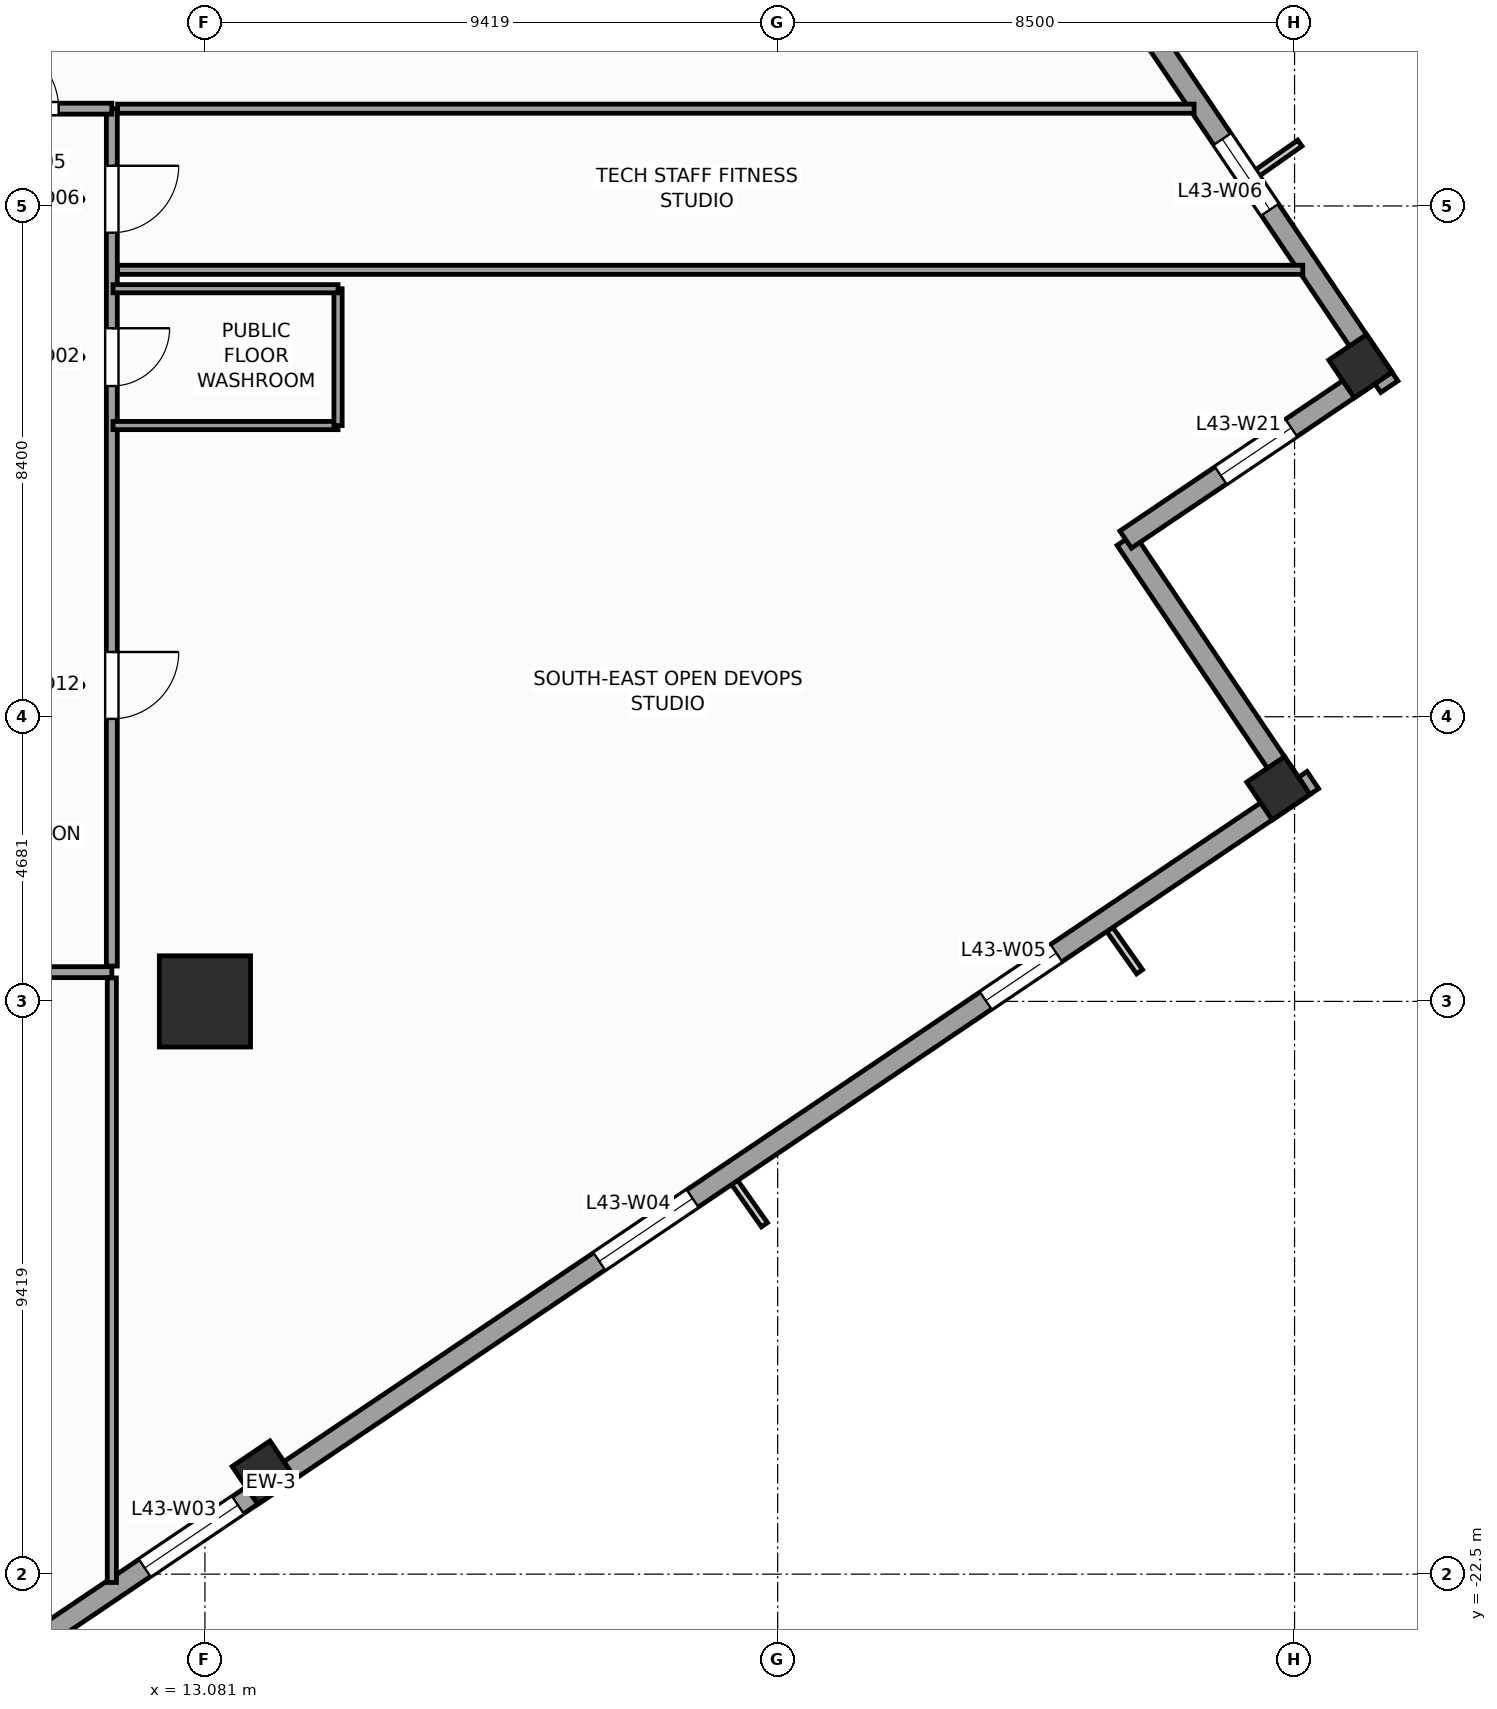
"""IFC4 building model, lengths in metres.
Left out: names, types, materials, properties, quantities, classifications, styles, units other than length and angle.
Written with IfcOpenShell. Run it as: python <this file> out.ifc"""

import sys

from ifc_helpers import new_model, si_unit, direction, frame, frame_2d, origin, origin_2d, place, context, subcontext, project, spatial, rectangle, extrude, source, transform, mapped, element, fill, save


model = new_model("IFC4")
c1 = context("Model", 3, precision=1e-05, world=origin(), true_north=direction((0.0, 1.0)))
c2 = subcontext(c1, "Body", "Model", "MODEL_VIEW")
j1 = project(units=[si_unit("LENGTHUNIT", "METRE"), si_unit("PLANEANGLEUNIT", "RADIAN")], contexts=[c1])
p1 = place(None, origin())
s1 = spatial("IfcSite", under=j1, at=p1, CompositionType="ELEMENT")
p2 = place(p1, origin())
s2 = spatial("IfcBuilding", under=s1, at=p2, CompositionType="ELEMENT")
p3 = place(p2, frame((0.0, 0.0, 180.4)))
s3 = spatial("IfcBuildingStorey", under=s2, at=p3, CompositionType="ELEMENT", Elevation=180.4)
m1 = source(origin(), c2, "Body", "SweptSolid", [
    extrude(rectangle(XDim=1.5, YDim=1.5, at=origin_2d()), origin(), (0.0, 0.0, 1.0), 4.0),
])
p4 = place(p3, frame((13.081, -13.081, 0.0), z_axis=(0.0, 0.0, 1.0), x_axis=(1.0, 0.0, 0.0)))
e1 = element("IfcColumn", 1, at=p4, inside=s3, PredefinedType="COLUMN", context=c2, shape_type="MappedRepresentation", body=[
    mapped(m1, transform((0.0, 0.0, 0.0), scale=1.0)),
])
m2 = source(origin(), c2, "Body", "SweptSolid", [
    extrude(rectangle(XDim=0.75, YDim=0.75, at=origin_2d()), origin(), (0.0, 0.0, 1.0), 4.0),
])
for number, where, z_axis, x_axis in (
    (2, (14.05, -20.83, 0.0), (0.0, 0.0, 1.0), (0.829, 0.559, 0.0)),
    (3, (30.734, -9.576, 0.0), (0.0, 0.0, 1.0), (0.829, 0.559, 0.0)),
    (4, (32.083, -2.635, 0.0), (0.0, 0.0, 1.0), (0.829, 0.559, 0.0)),
):
    element("IfcColumn", number, at=place(p3, frame(where, z_axis=z_axis, x_axis=x_axis)), inside=s3, PredefinedType="COLUMN", context=c2, shape_type="MappedRepresentation", body=[
        mapped(m2, transform((0.0, 0.0, 0.0), scale=1.0)),
    ])
p5 = place(p3, frame((-2.972, -32.558, 0.0), z_axis=(0.0, 0.0, 1.0), x_axis=(0.829036218961, 0.559194910251, 0.0)))
e5 = element("IfcWall", 5, at=p5, inside=s3, PredefinedType="STANDARD", context=c2, shape_type="SweptSolid", body=[
    extrude(rectangle(XDim=41.34, YDim=0.34, at=frame_2d((20.67, 0.0))), origin(), (0.0, 0.0, 1.0), 3.04),
])
p6 = place(p5, frame((4.261, 0.0, 0.56)))
e6 = element("IfcOpeningElement", 6, at=p6, cuts=e5, PredefinedType="OPENING", context=c2, shape_type="SweptSolid", body=[
    extrude(rectangle(XDim=1.4, YDim=2.4, at=frame_2d((0.7, 1.2))), frame((0.0, 0.18, 0.0), z_axis=(0.0, -1.0, 0.0), x_axis=(1.0, 0.0, 0.0)), (0.0, 0.0, 1.0), 0.36),
])
p7 = place(p5, frame((11.064, 0.0, 0.61)))
e7 = element("IfcOpeningElement", 7, at=p7, cuts=e5, PredefinedType="OPENING", context=c2, shape_type="SweptSolid", body=[
    extrude(rectangle(XDim=1.85, YDim=2.35, at=frame_2d((0.925, 1.175))), frame((0.0, 0.18, 0.0), z_axis=(0.0, -1.0, 0.0), x_axis=(1.0, 0.0, 0.0)), (0.0, 0.0, 1.0), 0.36),
])
p8 = place(p5, frame((18.168, 0.0, 0.61)))
e8 = element("IfcOpeningElement", 8, at=p8, cuts=e5, PredefinedType="OPENING", context=c2, shape_type="SweptSolid", body=[
    extrude(rectangle(XDim=1.85, YDim=2.35, at=frame_2d((0.925, 1.175))), frame((0.0, 0.18, 0.0), z_axis=(0.0, -1.0, 0.0), x_axis=(1.0, 0.0, 0.0)), (0.0, 0.0, 1.0), 0.36),
])
p9 = place(p5, frame((27.186, 0.0, 0.61)))
e9 = element("IfcOpeningElement", 9, at=p9, cuts=e5, PredefinedType="OPENING", context=c2, shape_type="SweptSolid", body=[
    extrude(rectangle(XDim=1.85, YDim=2.35, at=frame_2d((0.925, 1.175))), frame((0.0, 0.18, 0.0), z_axis=(0.0, -1.0, 0.0), x_axis=(1.0, 0.0, 0.0)), (0.0, 0.0, 1.0), 0.36),
])
p10 = place(p5, frame((34.852, 0.0, 0.56)))
e10 = element("IfcOpeningElement", 10, at=p10, cuts=e5, PredefinedType="OPENING", context=c2, shape_type="SweptSolid", body=[
    extrude(rectangle(XDim=1.4, YDim=2.4, at=frame_2d((0.7, 1.2))), frame((0.0, 0.18, 0.0), z_axis=(0.0, -1.0, 0.0), x_axis=(1.0, 0.0, 0.0)), (0.0, 0.0, 1.0), 0.36),
])
p11 = place(p3, frame((31.019, -9.631, 0.0), z_axis=(0.0, 0.0, 1.0), x_axis=(-0.559210350234, 0.829025804298, 0.0)))
e11 = element("IfcWall", 11, at=p11, inside=s3, PredefinedType="STANDARD", context=c2, shape_type="SweptSolid", body=[
    extrude(rectangle(XDim=5.0, YDim=0.34, at=frame_2d((2.5, 0.0))), origin(), (0.0, 0.0, 1.0), 3.74),
])
p12 = place(p3, frame((28.223, -5.486, 0.0), z_axis=(0.0, 0.0, 1.0), x_axis=(0.82905227345, 0.559171107879, 0.0)))
e12 = element("IfcWall", 12, at=p12, inside=s3, PredefinedType="STANDARD", context=c2, shape_type="SweptSolid", body=[
    extrude(rectangle(XDim=5.17, YDim=0.34, at=frame_2d((2.585, 0.0))), origin(), (0.0, 0.0, 1.0), 3.04),
])
p13 = place(p12, frame((1.885, 0.0, 0.56)))
e13 = element("IfcOpeningElement", 13, at=p13, cuts=e12, PredefinedType="OPENING", context=c2, shape_type="SweptSolid", body=[
    extrude(rectangle(XDim=1.4, YDim=2.4, at=frame_2d((0.7, 1.2))), frame((0.0, 0.18, 0.0), z_axis=(0.0, -1.0, 0.0), x_axis=(1.0, 0.0, 0.0)), (0.0, 0.0, 1.0), 0.36),
])
p14 = place(p3, frame((32.558, -2.972, 0.0), z_axis=(0.0, 0.0, 1.0), x_axis=(-0.559194910251, 0.829036218961, 0.0)))
e14 = element("IfcWall", 14, at=p14, inside=s3, PredefinedType="STANDARD", context=c2, shape_type="SweptSolid", body=[
    extrude(rectangle(XDim=41.34, YDim=0.34, at=frame_2d((20.67, 0.0))), origin(), (0.0, 0.0, 1.0), 3.04),
])
p15 = place(p14, frame((25.745, 0.0, 0.0)))
e15 = element("IfcOpeningElement", 15, at=p15, cuts=e14, PredefinedType="OPENING", context=c2, shape_type="SweptSolid", body=[
    extrude(rectangle(XDim=1.05, YDim=2.25, at=frame_2d((0.525, 1.125))), frame((0.0, 0.18, 0.0), z_axis=(0.0, -1.0, 0.0), x_axis=(1.0, 0.0, 0.0)), (0.0, 0.0, 1.0), 0.36),
])
p16 = place(p14, frame((3.511, 0.0, 0.56)))
e16 = element("IfcOpeningElement", 16, at=p16, cuts=e14, PredefinedType="OPENING", context=c2, shape_type="SweptSolid", body=[
    extrude(rectangle(XDim=1.4, YDim=2.4, at=frame_2d((0.7, 1.2))), frame((0.0, 0.18, 0.0), z_axis=(0.0, -1.0, 0.0), x_axis=(1.0, 0.0, 0.0)), (0.0, 0.0, 1.0), 0.36),
])
p17 = place(p14, frame((11.064, 0.0, 0.61)))
e17 = element("IfcOpeningElement", 17, at=p17, cuts=e14, PredefinedType="OPENING", context=c2, shape_type="SweptSolid", body=[
    extrude(rectangle(XDim=1.85, YDim=2.35, at=frame_2d((0.925, 1.175))), frame((0.0, 0.18, 0.0), z_axis=(0.0, -1.0, 0.0), x_axis=(1.0, 0.0, 0.0)), (0.0, 0.0, 1.0), 0.36),
])
p18 = place(p14, frame((18.168, 0.0, 0.61)))
e18 = element("IfcOpeningElement", 18, at=p18, cuts=e14, PredefinedType="OPENING", context=c2, shape_type="SweptSolid", body=[
    extrude(rectangle(XDim=1.85, YDim=2.35, at=frame_2d((0.925, 1.175))), frame((0.0, 0.18, 0.0), z_axis=(0.0, -1.0, 0.0), x_axis=(1.0, 0.0, 0.0)), (0.0, 0.0, 1.0), 0.36),
])
p19 = place(p14, frame((27.936, 0.0, 0.61)))
e19 = element("IfcOpeningElement", 19, at=p19, cuts=e14, PredefinedType="OPENING", context=c2, shape_type="SweptSolid", body=[
    extrude(rectangle(XDim=1.85, YDim=2.35, at=frame_2d((0.925, 1.175))), frame((0.0, 0.18, 0.0), z_axis=(0.0, -1.0, 0.0), x_axis=(1.0, 0.0, 0.0)), (0.0, 0.0, 1.0), 0.36),
])
p20 = place(p14, frame((34.852, 0.0, 0.56)))
e20 = element("IfcOpeningElement", 20, at=p20, cuts=e14, PredefinedType="OPENING", context=c2, shape_type="SweptSolid", body=[
    extrude(rectangle(XDim=1.4, YDim=2.4, at=frame_2d((0.7, 1.2))), frame((0.0, 0.18, 0.0), z_axis=(0.0, -1.0, 0.0), x_axis=(1.0, 0.0, 0.0)), (0.0, 0.0, 1.0), 0.36),
])
p21 = place(p3, frame((-10.45, -12.6, 0.0), z_axis=(0.0, 0.0, 1.0), x_axis=(1.0, 0.0, 0.0)))
e21 = element("IfcWall", 21, at=p21, inside=s3, PredefinedType="PARTITIONING", context=c2, shape_type="SweptSolid", body=[
    extrude(rectangle(XDim=22.0, YDim=0.18, at=frame_2d((11.0, 0.0))), origin(), (0.0, 0.0, 1.0), 3.74),
])
p22 = place(p21, frame((11.286, 0.0, 0.0)))
e22 = element("IfcOpeningElement", 22, at=p22, cuts=e21, PredefinedType="OPENING", context=c2, shape_type="SweptSolid", body=[
    extrude(rectangle(XDim=0.95, YDim=2.1, at=frame_2d((0.475, 1.05))), frame((0.0, 0.1, 0.0), z_axis=(0.0, -1.0, 0.0), x_axis=(1.0, 0.0, 0.0)), (0.0, 0.0, 1.0), 0.2),
])
p23 = place(p21, frame((4.839, 0.0, 0.0)))
e23 = element("IfcOpeningElement", 23, at=p23, cuts=e21, PredefinedType="OPENING", context=c2, shape_type="SweptSolid", body=[
    extrude(rectangle(XDim=1.1, YDim=2.2, at=frame_2d((0.55, 1.1))), frame((0.0, 0.1, 0.0), z_axis=(0.0, -1.0, 0.0), x_axis=(1.0, 0.0, 0.0)), (0.0, 0.0, 1.0), 0.2),
])
p24 = place(p21, frame((16.66, 0.0, 0.0)))
e24 = element("IfcOpeningElement", 24, at=p24, cuts=e21, PredefinedType="OPENING", context=c2, shape_type="SweptSolid", body=[
    extrude(rectangle(XDim=1.1, YDim=2.2, at=frame_2d((0.55, 1.1))), frame((0.0, 0.1, 0.0), z_axis=(0.0, -1.0, 0.0), x_axis=(1.0, 0.0, 0.0)), (0.0, 0.0, 1.0), 0.2),
])
p25 = place(p3, frame((11.55, -12.5, 0.0), z_axis=(0.0, 0.0, 1.0), x_axis=(0.0, 1.0, 0.0)))
e25 = element("IfcWall", 25, at=p25, inside=s3, PredefinedType="PARTITIONING", context=c2, shape_type="SweptSolid", body=[
    extrude(rectangle(XDim=14.1, YDim=0.18, at=frame_2d((7.05, 0.0))), origin(), (0.0, 0.0, 1.0), 3.74),
])
p26 = place(p25, frame((9.539, 0.0, 0.0)))
e26 = element("IfcOpeningElement", 26, at=p26, cuts=e25, PredefinedType="OPENING", context=c2, shape_type="SweptSolid", body=[
    extrude(rectangle(XDim=0.95, YDim=2.1, at=frame_2d((0.475, 1.05))), frame((0.0, 0.1, 0.0), z_axis=(0.0, -1.0, 0.0), x_axis=(1.0, 0.0, 0.0)), (0.0, 0.0, 1.0), 0.2),
])
p27 = place(p25, frame((12.061, 0.0, 0.0)))
e27 = element("IfcOpeningElement", 27, at=p27, cuts=e25, PredefinedType="OPENING", context=c2, shape_type="SweptSolid", body=[
    extrude(rectangle(XDim=1.1, YDim=2.2, at=frame_2d((0.55, 1.1))), frame((0.0, 0.1, 0.0), z_axis=(0.0, -1.0, 0.0), x_axis=(1.0, 0.0, 0.0)), (0.0, 0.0, 1.0), 0.2),
])
p28 = place(p25, frame((4.065, 0.0, 0.0)))
e28 = element("IfcOpeningElement", 28, at=p28, cuts=e25, PredefinedType="OPENING", context=c2, shape_type="SweptSolid", body=[
    extrude(rectangle(XDim=1.1, YDim=2.2, at=frame_2d((0.55, 1.1))), frame((0.0, 0.1, 0.0), z_axis=(0.0, -1.0, 0.0), x_axis=(1.0, 0.0, 0.0)), (0.0, 0.0, 1.0), 0.2),
])
p29 = place(p3, frame((8.7, 1.6, 0.0), z_axis=(0.0, 0.0, 1.0), x_axis=(1.0, 0.0, 0.0)))
e29 = element("IfcWall", 29, at=p29, inside=s3, PredefinedType="PARTITIONING", context=c2, shape_type="SweptSolid", body=[
    extrude(rectangle(XDim=2.85, YDim=0.18, at=frame_2d((1.425, 0.0))), origin(), (0.0, 0.0, 1.0), 3.74),
])
p30 = place(p29, frame((0.875, 0.0, 0.0)))
e30 = element("IfcOpeningElement", 30, at=p30, cuts=e29, PredefinedType="OPENING", context=c2, shape_type="SweptSolid", body=[
    extrude(rectangle(XDim=1.1, YDim=2.2, at=frame_2d((0.55, 1.1))), frame((0.0, 0.1, 0.0), z_axis=(0.0, -1.0, 0.0), x_axis=(1.0, 0.0, 0.0)), (0.0, 0.0, 1.0), 0.2),
])
p31 = place(p3, frame((11.645, -1.05, 0.0), z_axis=(0.0, 0.0, 1.0), x_axis=(1.0, 0.0, 0.0)))
e31 = element("IfcWall", 31, at=p31, inside=s3, PredefinedType="PARTITIONING", context=c2, shape_type="SweptSolid", body=[
    extrude(rectangle(XDim=19.49, YDim=0.15, at=frame_2d((9.745, 0.0))), origin(), (0.0, 0.0, 1.0), 3.74),
])
p32 = place(p3, frame((11.645, 1.6, 0.0), z_axis=(0.0, 0.0, 1.0), x_axis=(1.0, 0.0, 0.0)))
e32 = element("IfcWall", 32, at=p32, inside=s3, PredefinedType="PARTITIONING", context=c2, shape_type="SweptSolid", body=[
    extrude(rectangle(XDim=17.703, YDim=0.15, at=frame_2d((8.851, 0.0))), origin(), (0.0, 0.0, 1.0), 3.74),
])
p33 = place(p3, frame((11.55, -22.636, 0.0), z_axis=(0.0, 0.0, 1.0), x_axis=(0.0, 1.0, 0.0)))
e33 = element("IfcWall", 33, at=p33, inside=s3, PredefinedType="PARTITIONING", context=c2, shape_type="SweptSolid", body=[
    extrude(rectangle(XDim=9.941, YDim=0.15, at=frame_2d((4.971, 0.0))), origin(), (0.0, 0.0, 1.0), 3.74),
])
p34 = place(p3, frame((11.57, -3.611, 0.0), z_axis=(0.0, 0.0, 1.0), x_axis=(1.0, 0.0, 0.0)))
e34 = element("IfcWall", 34, at=p34, inside=s3, PredefinedType="PARTITIONING", context=c2, shape_type="SweptSolid", body=[
    extrude(rectangle(XDim=3.7, YDim=0.135, at=frame_2d((1.85, 0.0))), origin(), (0.0, 0.0, 1.0), 3.74),
])
p35 = place(p3, frame((15.27, -3.611, 0.0), z_axis=(0.0, 0.0, 1.0), x_axis=(0.0, 1.0, 0.0)))
e35 = element("IfcWall", 35, at=p35, inside=s3, PredefinedType="PARTITIONING", context=c2, shape_type="SweptSolid", body=[
    extrude(rectangle(XDim=2.25, YDim=0.135, at=frame_2d((1.125, 0.0))), origin(), (0.0, 0.0, 1.0), 3.24),
])
p36 = place(p3, frame((11.57, -1.361, 0.0), z_axis=(0.0, 0.0, 1.0), x_axis=(1.0, 0.0, 0.0)))
e36 = element("IfcWall", 36, at=p36, inside=s3, PredefinedType="PARTITIONING", context=c2, shape_type="SweptSolid", body=[
    extrude(rectangle(XDim=3.7, YDim=0.135, at=frame_2d((1.85, 0.0))), origin(), (0.0, 0.0, 1.0), 3.74),
])
m3 = source(origin(), c2, "Body", "SweptSolid", [
    extrude(rectangle(XDim=1.85, YDim=2.35, at=frame_2d((0.925, 1.175))), frame((0.0, 0.03, 0.0), z_axis=(0.0, -1.0, 0.0), x_axis=(1.0, 0.0, 0.0)), (0.0, 0.0, 1.0), 0.06),
])
p37 = place(p8, origin())
e37 = element("IfcWindow", 37, at=p37, inside=s3, PartitioningType="SINGLE_PANEL", PredefinedType="WINDOW", context=c2, shape_type="MappedRepresentation", body=[
    mapped(m3, transform((0.0, 0.0, 0.0), scale=1.0)),
])
fill(e8, e37)
p38 = place(p9, origin())
e38 = element("IfcWindow", 38, at=p38, inside=s3, PartitioningType="SINGLE_PANEL", PredefinedType="WINDOW", context=c2, shape_type="MappedRepresentation", body=[
    mapped(m3, transform((0.0, 0.0, 0.0), scale=1.0)),
])
fill(e9, e38)
m4 = source(origin(), c2, "Body", "SweptSolid", [
    extrude(rectangle(XDim=1.4, YDim=2.4, at=frame_2d((0.7, 1.2))), frame((0.0, 0.03, 0.0), z_axis=(0.0, -1.0, 0.0), x_axis=(1.0, 0.0, 0.0)), (0.0, 0.0, 1.0), 0.06),
])
p39 = place(p10, origin())
e39 = element("IfcWindow", 39, at=p39, inside=s3, PartitioningType="SINGLE_PANEL", PredefinedType="WINDOW", context=c2, shape_type="MappedRepresentation", body=[
    mapped(m4, transform((0.0, 0.0, 0.0), scale=1.0)),
])
fill(e10, e39)
p40 = place(p16, origin())
e40 = element("IfcWindow", 40, at=p40, inside=s3, PartitioningType="SINGLE_PANEL", PredefinedType="WINDOW", context=c2, shape_type="MappedRepresentation", body=[
    mapped(m4, transform((0.0, 0.0, 0.0), scale=1.0)),
])
fill(e16, e40)
p41 = place(p13, origin())
e41 = element("IfcWindow", 41, at=p41, inside=s3, PartitioningType="SINGLE_PANEL", PredefinedType="WINDOW", context=c2, shape_type="MappedRepresentation", body=[
    mapped(m4, transform((0.0, 0.0, 0.0), scale=1.0)),
])
fill(e13, e41)
m5 = source(origin(), c2, "Body", "SweptSolid", [
    extrude(rectangle(XDim=0.95, YDim=2.1, at=frame_2d((0.475, 1.05))), frame((0.0, 0.025, 0.0), z_axis=(0.0, -1.0, 0.0), x_axis=(1.0, 0.0, 0.0)), (0.0, 0.0, 1.0), 0.05),
])
p42 = place(p26, frame((0.95, 0.0, 0.0), z_axis=(0.0, 0.0, 1.0), x_axis=(-1.0, 0.0, 0.0)))
e42 = element("IfcDoor", 42, at=p42, inside=s3, OperationType="SINGLE_SWING_RIGHT", PredefinedType="DOOR", context=c2, shape_type="MappedRepresentation", body=[
    mapped(m5, transform((0.0, 0.0, 0.0), scale=1.0)),
])
fill(e26, e42)
m6 = source(origin(), c2, "Body", "SweptSolid", [
    extrude(rectangle(XDim=1.1, YDim=2.2, at=frame_2d((0.55, 1.1))), frame((0.0, 0.025, 0.0), z_axis=(0.0, -1.0, 0.0), x_axis=(1.0, 0.0, 0.0)), (0.0, 0.0, 1.0), 0.05),
])
p43 = place(p30, origin())
e43 = element("IfcDoor", 43, at=p43, inside=s3, OperationType="SINGLE_SWING_LEFT", PredefinedType="DOOR", context=c2, shape_type="MappedRepresentation", body=[
    mapped(m6, transform((0.0, 0.0, 0.0), scale=1.0)),
])
fill(e30, e43)
p44 = place(p27, frame((1.1, 0.0, 0.0), z_axis=(0.0, 0.0, 1.0), x_axis=(-1.0, 0.0, 0.0)))
e44 = element("IfcDoor", 44, at=p44, inside=s3, OperationType="SINGLE_SWING_RIGHT", PredefinedType="DOOR", context=c2, shape_type="MappedRepresentation", body=[
    mapped(m6, transform((0.0, 0.0, 0.0), scale=1.0)),
])
fill(e27, e44)
p45 = place(p28, frame((1.1, 0.0, 0.0), z_axis=(0.0, 0.0, 1.0), x_axis=(-1.0, 0.0, 0.0)))
e45 = element("IfcDoor", 45, at=p45, inside=s3, OperationType="SINGLE_SWING_RIGHT", PredefinedType="DOOR", context=c2, shape_type="MappedRepresentation", body=[
    mapped(m6, transform((0.0, 0.0, 0.0), scale=1.0)),
])
fill(e28, e45)
save(model, sys.argv[1])
